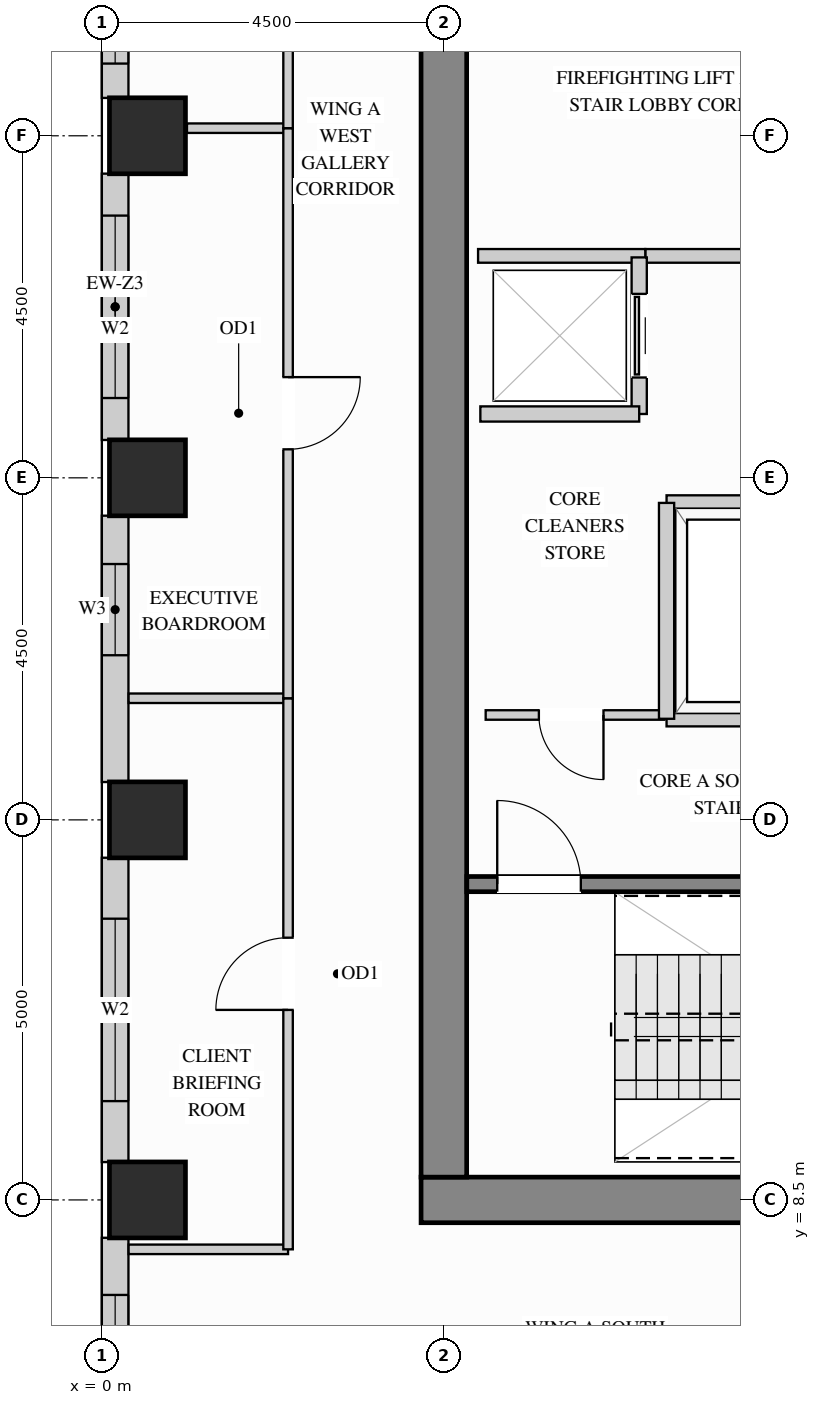
"""IFC4 building model, lengths in metres.
Left out: names, types, materials, properties, quantities, classifications, styles, units other than length and angle.
Written with IfcOpenShell. Run it as: python <this file> out.ifc"""

import sys

from ifc_helpers import new_model, si_unit, direction, frame, frame_2d, origin, origin_2d, place, context, subcontext, project, spatial, rectangle, extrude, source, transform, mapped, element, fill, save


model = new_model("IFC4")
c1 = context("Model", 3, precision=1e-05, world=origin(), true_north=direction((0.0, 1.0)))
c2 = subcontext(c1, "Body", "Model", "MODEL_VIEW")
j1 = project(units=[si_unit("LENGTHUNIT", "METRE"), si_unit("PLANEANGLEUNIT", "RADIAN")], contexts=[c1])
p1 = place(None, origin())
s1 = spatial("IfcSite", under=j1, at=p1, CompositionType="ELEMENT")
p2 = place(p1, origin())
s2 = spatial("IfcBuilding", under=s1, at=p2, CompositionType="ELEMENT")
p3 = place(p2, frame((0.0, 0.0, 146.7)))
s3 = spatial("IfcBuildingStorey", under=s2, at=p3, CompositionType="ELEMENT", Elevation=146.7)
m1 = source(origin(), c2, "Body", "SweptSolid", [
    extrude(rectangle(XDim=1.0, YDim=1.0, at=origin_2d()), origin(), (0.0, 0.0, 1.0), 3.4),
])
for number, where, z_axis, x_axis in (
    (1, (0.6, 13.5, 0.0), (0.0, 0.0, 1.0), (1.0, 0.0, 0.0)),
    (2, (0.6, 18.0, 0.0), (0.0, 0.0, 1.0), (1.0, 0.0, 0.0)),
    (3, (0.6, 22.5, 0.0), (0.0, 0.0, 1.0), (1.0, 0.0, 0.0)),
    (4, (0.6, 8.5, 0.0), (0.0, 0.0, 1.0), (1.0, 0.0, 0.0)),
):
    element("IfcColumn", number, at=place(p3, frame(where, z_axis=z_axis, x_axis=x_axis)), inside=s3, PredefinedType="COLUMN", context=c2, shape_type="MappedRepresentation", body=[
        mapped(m1, transform((0.0, 0.0, 0.0), x_axis=(1.0, 0.0, 0.0), y_axis=(0.0, 1.0, 0.0), z_axis=(0.0, 0.0, 1.0))),
    ])
m2 = source(origin(), c2, "Body", "SweptSolid", [
    extrude(rectangle(XDim=10.6, YDim=0.6, at=frame_2d((5.3, 0.0))), origin(), (0.0, 0.0, 1.0), 3.4),
])
p4 = place(p3, frame((4.2, 8.5, 0.0), z_axis=(0.0, 0.0, 1.0), x_axis=(1.0, 0.0, 0.0)))
e5 = element("IfcWall", 5, at=p4, inside=s3, PredefinedType="SHEAR", context=c2, shape_type="MappedRepresentation", body=[
    mapped(m2, transform((0.0, 0.0, 0.0), x_axis=(1.0, 0.0, 0.0), y_axis=(0.0, 1.0, 0.0), z_axis=(0.0, 0.0, 1.0))),
])
m3 = source(origin(), c2, "Body", "SweptSolid", [
    extrude(rectangle(XDim=20.4, YDim=0.6, at=frame_2d((10.2, 0.0))), origin(), (0.0, 0.0, 1.0), 3.4),
])
p5 = place(p3, frame((4.5, 8.8, 0.0), z_axis=(0.0, 0.0, 1.0), x_axis=(0.0, 1.0, 0.0)))
e6 = element("IfcWall", 6, at=p5, inside=s3, PredefinedType="SHEAR", context=c2, shape_type="MappedRepresentation", body=[
    mapped(m3, transform((0.0, 0.0, 0.0), x_axis=(1.0, 0.0, 0.0), y_axis=(0.0, 1.0, 0.0), z_axis=(0.0, 0.0, 1.0))),
])
p6 = place(p3, frame((0.175, 26.302, 0.0), z_axis=(0.0, 0.0, 1.0), x_axis=(0.0, -1.0, 0.0)))
e7 = element("IfcWall", 7, at=p6, inside=s3, PredefinedType="SOLIDWALL", context=c2, shape_type="SweptSolid", body=[
    extrude(rectangle(XDim=3.304, YDim=0.35, at=frame_2d((1.652, 0.0))), origin(), (0.0, 0.0, 1.0), 2.612),
])
p7 = place(p6, frame((0.452, 0.0, 0.78)))
e8 = element("IfcOpeningElement", 8, at=p7, cuts=e7, PredefinedType="OPENING", context=c2, shape_type="SweptSolid", body=[
    extrude(rectangle(XDim=2.4, YDim=1.652, at=frame_2d((1.2, 0.826))), frame((0.0, 0.185, 0.0), z_axis=(0.0, -1.0, 0.0), x_axis=(1.0, 0.0, 0.0)), (0.0, 0.0, 1.0), 0.37),
])
p8 = place(p3, frame((0.175, 22.002, 0.0), z_axis=(0.0, 0.0, 1.0), x_axis=(0.0, -1.0, 0.0)))
e9 = element("IfcWall", 9, at=p8, inside=s3, PredefinedType="SOLIDWALL", context=c2, shape_type="SweptSolid", body=[
    extrude(rectangle(XDim=3.504, YDim=0.35, at=frame_2d((1.752, 0.0))), origin(), (0.0, 0.0, 1.0), 2.612),
])
p9 = place(p8, frame((0.552, 0.0, 0.78)))
e10 = element("IfcOpeningElement", 10, at=p9, cuts=e9, PredefinedType="OPENING", context=c2, shape_type="SweptSolid", body=[
    extrude(rectangle(XDim=2.4, YDim=1.652, at=frame_2d((1.2, 0.826))), frame((0.0, 0.185, 0.0), z_axis=(0.0, -1.0, 0.0), x_axis=(1.0, 0.0, 0.0)), (0.0, 0.0, 1.0), 0.37),
])
p10 = place(p3, frame((0.175, 17.502, 0.0), z_axis=(0.0, 0.0, 1.0), x_axis=(0.0, -1.0, 0.0)))
e11 = element("IfcWall", 11, at=p10, inside=s3, PredefinedType="SOLIDWALL", context=c2, shape_type="SweptSolid", body=[
    extrude(rectangle(XDim=3.504, YDim=0.35, at=frame_2d((1.752, 0.0))), origin(), (0.0, 0.0, 1.0), 2.612),
])
p11 = place(p10, frame((0.636, 0.0, 0.78)))
e12 = element("IfcOpeningElement", 12, at=p11, cuts=e11, PredefinedType="OPENING", context=c2, shape_type="SweptSolid", body=[
    extrude(rectangle(XDim=1.2, YDim=1.652, at=frame_2d((0.6, 0.826))), frame((0.0, 0.185, 0.0), z_axis=(0.0, -1.0, 0.0), x_axis=(1.0, 0.0, 0.0)), (0.0, 0.0, 1.0), 0.37),
])
p12 = place(p3, frame((0.175, 13.002, 0.0), z_axis=(0.0, 0.0, 1.0), x_axis=(0.0, -1.0, 0.0)))
e13 = element("IfcWall", 13, at=p12, inside=s3, PredefinedType="SOLIDWALL", context=c2, shape_type="SweptSolid", body=[
    extrude(rectangle(XDim=4.004, YDim=0.35, at=frame_2d((2.002, 0.0))), origin(), (0.0, 0.0, 1.0), 2.612),
])
p13 = place(p12, frame((0.802, 0.0, 0.78)))
e14 = element("IfcOpeningElement", 14, at=p13, cuts=e13, PredefinedType="OPENING", context=c2, shape_type="SweptSolid", body=[
    extrude(rectangle(XDim=2.4, YDim=1.652, at=frame_2d((1.2, 0.826))), frame((0.0, 0.185, 0.0), z_axis=(0.0, -1.0, 0.0), x_axis=(1.0, 0.0, 0.0)), (0.0, 0.0, 1.0), 0.37),
])
p14 = place(p3, frame((0.175, 8.002, 0.0), z_axis=(0.0, 0.0, 1.0), x_axis=(0.0, -1.0, 0.0)))
e15 = element("IfcWall", 15, at=p14, inside=s3, PredefinedType="SOLIDWALL", context=c2, shape_type="SweptSolid", body=[
    extrude(rectangle(XDim=4.004, YDim=0.35, at=frame_2d((2.002, 0.0))), origin(), (0.0, 0.0, 1.0), 2.612),
])
p15 = place(p14, frame((0.752, 0.0, 0.78)))
e16 = element("IfcOpeningElement", 16, at=p15, cuts=e15, PredefinedType="OPENING", context=c2, shape_type="SweptSolid", body=[
    extrude(rectangle(XDim=1.2, YDim=1.652, at=frame_2d((0.6, 0.826))), frame((0.0, 0.185, 0.0), z_axis=(0.0, -1.0, 0.0), x_axis=(1.0, 0.0, 0.0)), (0.0, 0.0, 1.0), 0.37),
])
p16 = place(p3, frame((7.15, 20.92, 0.0), z_axis=(0.0, 0.0, 1.0), x_axis=(1.0, 0.0, 0.0)))
e17 = element("IfcWall", 17, at=p16, inside=s3, PredefinedType="PARTITIONING", context=c2, shape_type="SweptSolid", body=[
    extrude(rectangle(XDim=4.68, YDim=0.18, at=frame_2d((2.34, 0.0))), origin(), (0.0, 0.0, 1.0), 3.385),
])
p17 = place(p16, frame((2.2, 0.0, 0.0)))
e18 = element("IfcOpeningElement", 18, at=p17, cuts=e17, PredefinedType="OPENING", context=c2, shape_type="SweptSolid", body=[
    extrude(rectangle(XDim=1.1, YDim=2.15, at=frame_2d((0.55, 1.075))), frame((0.0, 0.1, 0.0), z_axis=(0.0, -1.0, 0.0), x_axis=(1.0, 0.0, 0.0)), (0.0, 0.0, 1.0), 0.2),
])
m4 = source(origin(), c2, "Body", "SweptSolid", [
    extrude(rectangle(XDim=2.2, YDim=0.18, at=frame_2d((1.1, 0.0))), origin(), (0.0, 0.0, 1.0), 3.385),
])
p18 = place(p3, frame((4.95, 20.92, 0.0), z_axis=(0.0, 0.0, 1.0), x_axis=(1.0, 0.0, 0.0)))
e19 = element("IfcWall", 19, at=p18, inside=s3, PredefinedType="PARTITIONING", context=c2, shape_type="MappedRepresentation", body=[
    mapped(m4, transform((0.0, 0.0, 0.0), x_axis=(1.0, 0.0, 0.0), y_axis=(0.0, 1.0, 0.0), z_axis=(0.0, 0.0, 1.0))),
])
p19 = place(p3, frame((5.05, 14.88, 0.0), z_axis=(0.0, 0.0, 1.0), x_axis=(1.0, 0.0, 0.0)))
e20 = element("IfcWall", 20, at=p19, inside=s3, PredefinedType="PARTITIONING", context=c2, shape_type="SweptSolid", body=[
    extrude(rectangle(XDim=2.35, YDim=0.125, at=frame_2d((1.175, 0.0))), origin(), (0.0, 0.0, 1.0), 3.385),
])
p20 = place(p19, frame((0.7, 0.0, 0.0)))
e21 = element("IfcOpeningElement", 21, at=p20, cuts=e20, PredefinedType="OPENING", context=c2, shape_type="SweptSolid", body=[
    extrude(rectangle(XDim=0.85, YDim=2.1, at=frame_2d((0.425, 1.05))), frame((0.0, 0.073, 0.0), z_axis=(0.0, -1.0, 0.0), x_axis=(1.0, 0.0, 0.0)), (0.0, 0.0, 1.0), 0.145),
])
m5 = source(origin(), c2, "Body", "SweptSolid", [
    extrude(rectangle(XDim=2.098, YDim=0.125, at=frame_2d((1.049, 0.0))), origin(), (0.0, 0.0, 1.0), 3.385),
])
for number, where, z_axis, x_axis in (
    (22, (0.352, 7.85, 0.0), (0.0, 0.0, 1.0), (1.0, 0.0, 0.0)),
    (23, (0.352, 15.1, 0.0), (0.0, 0.0, 1.0), (1.0, 0.0, 0.0)),
):
    element("IfcWall", number, at=place(p3, frame(where, z_axis=z_axis, x_axis=x_axis)), inside=s3, PredefinedType="PARTITIONING", context=c2, shape_type="MappedRepresentation", body=[
        mapped(m5, transform((0.0, 0.0, 0.0), x_axis=(1.0, 0.0, 0.0), y_axis=(0.0, 1.0, 0.0), z_axis=(0.0, 0.0, 1.0))),
    ])
m6 = source(origin(), c2, "Body", "SweptSolid", [
    extrude(rectangle(XDim=1.33, YDim=0.125, at=frame_2d((0.665, 0.0))), origin(), (0.0, 0.0, 1.0), 3.385),
])
p21 = place(p3, frame((1.12, 22.6, 0.0), z_axis=(0.0, 0.0, 1.0), x_axis=(1.0, 0.0, 0.0)))
e24 = element("IfcWall", 24, at=p21, inside=s3, PredefinedType="PARTITIONING", context=c2, shape_type="MappedRepresentation", body=[
    mapped(m6, transform((0.0, 0.0, 0.0), x_axis=(1.0, 0.0, 0.0), y_axis=(0.0, 1.0, 0.0), z_axis=(0.0, 0.0, 1.0))),
])
p22 = place(p3, frame((2.45, 7.85, 0.0), z_axis=(0.0, 0.0, 1.0), x_axis=(0.0, 1.0, 0.0)))
e25 = element("IfcWall", 25, at=p22, inside=s3, PredefinedType="PARTITIONING", context=c2, shape_type="SweptSolid", body=[
    extrude(rectangle(XDim=7.25, YDim=0.125, at=frame_2d((3.625, 0.0))), origin(), (0.0, 0.0, 1.0), 3.385),
])
p23 = place(p22, frame((3.15, 0.0, 0.0)))
e26 = element("IfcOpeningElement", 26, at=p23, cuts=e25, PredefinedType="OPENING", context=c2, shape_type="SweptSolid", body=[
    extrude(rectangle(XDim=0.95, YDim=2.15, at=frame_2d((0.475, 1.075))), frame((0.0, 0.073, 0.0), z_axis=(0.0, -1.0, 0.0), x_axis=(1.0, 0.0, 0.0)), (0.0, 0.0, 1.0), 0.145),
])
p24 = place(p3, frame((2.45, 15.1, 0.0), z_axis=(0.0, 0.0, 1.0), x_axis=(0.0, 1.0, 0.0)))
e27 = element("IfcWall", 27, at=p24, inside=s3, PredefinedType="PARTITIONING", context=c2, shape_type="SweptSolid", body=[
    extrude(rectangle(XDim=7.5, YDim=0.125, at=frame_2d((3.75, 0.0))), origin(), (0.0, 0.0, 1.0), 3.385),
])
p25 = place(p24, frame((3.275, 0.0, 0.0)))
e28 = element("IfcOpeningElement", 28, at=p25, cuts=e27, PredefinedType="OPENING", context=c2, shape_type="SweptSolid", body=[
    extrude(rectangle(XDim=0.95, YDim=2.15, at=frame_2d((0.475, 1.075))), frame((0.0, 0.073, 0.0), z_axis=(0.0, -1.0, 0.0), x_axis=(1.0, 0.0, 0.0)), (0.0, 0.0, 1.0), 0.145),
])
p26 = place(p3, frame((2.45, 22.6, 0.0), z_axis=(0.0, 0.0, 1.0), x_axis=(0.0, 1.0, 0.0)))
e29 = element("IfcWall", 29, at=p26, inside=s3, PredefinedType="PARTITIONING", context=c2, shape_type="SweptSolid", body=[
    extrude(rectangle(XDim=7.45, YDim=0.125, at=frame_2d((3.725, 0.0))), origin(), (0.0, 0.0, 1.0), 3.385),
])
p27 = place(p26, frame((3.25, 0.0, 0.0)))
e30 = element("IfcOpeningElement", 30, at=p27, cuts=e29, PredefinedType="OPENING", context=c2, shape_type="SweptSolid", body=[
    extrude(rectangle(XDim=0.95, YDim=2.15, at=frame_2d((0.475, 1.075))), frame((0.0, 0.073, 0.0), z_axis=(0.0, -1.0, 0.0), x_axis=(1.0, 0.0, 0.0)), (0.0, 0.0, 1.0), 0.145),
])
p28 = place(p3, frame((7.07, 18.84, 0.0), z_axis=(0.0, 0.0, 1.0), x_axis=(0.0, 1.0, 0.0)))
e31 = element("IfcWall", 31, at=p28, inside=s3, PredefinedType="PARTITIONING", context=c2, shape_type="SweptSolid", body=[
    extrude(rectangle(XDim=2.06, YDim=0.2, at=frame_2d((1.03, 0.0))), origin(), (0.0, 0.0, 1.0), 3.385),
])
p29 = place(p28, frame((0.48, 0.0, 0.0)))
e32 = element("IfcOpeningElement", 32, at=p29, cuts=e31, PredefinedType="OPENING", context=c2, shape_type="SweptSolid", body=[
    extrude(rectangle(XDim=1.1, YDim=2.2, at=frame_2d((0.55, 1.1))), frame((0.0, 0.11, 0.0), z_axis=(0.0, -1.0, 0.0), x_axis=(1.0, 0.0, 0.0)), (0.0, 0.0, 1.0), 0.22),
])
m7 = source(origin(), c2, "Body", "SweptSolid", [
    extrude(rectangle(XDim=2.09, YDim=0.2, at=frame_2d((1.045, 0.0))), origin(), (0.0, 0.0, 1.0), 3.385),
])
p30 = place(p3, frame((4.98, 18.84, 0.0), z_axis=(0.0, 0.0, 1.0), x_axis=(1.0, 0.0, 0.0)))
e33 = element("IfcWall", 33, at=p30, inside=s3, PredefinedType="PARTITIONING", context=c2, shape_type="MappedRepresentation", body=[
    mapped(m7, transform((0.0, 0.0, 0.0), x_axis=(1.0, 0.0, 0.0), y_axis=(0.0, 1.0, 0.0), z_axis=(0.0, 0.0, 1.0))),
])
m8 = source(origin(), c2, "Body", "SweptSolid", [
    extrude(rectangle(XDim=2.04, YDim=0.2, at=frame_2d((1.02, 0.0))), origin(), (0.0, 0.0, 1.0), 3.385),
])
for number, where, z_axis, x_axis in (
    (34, (7.43, 17.67, 0.0), (0.0, 0.0, 1.0), (1.0, 0.0, 0.0)),
    (35, (7.43, 14.83, 0.0), (0.0, 0.0, 1.0), (1.0, 0.0, 0.0)),
):
    element("IfcWall", number, at=place(p3, frame(where, z_axis=z_axis, x_axis=x_axis)), inside=s3, PredefinedType="PARTITIONING", context=c2, shape_type="MappedRepresentation", body=[
        mapped(m8, transform((0.0, 0.0, 0.0), x_axis=(1.0, 0.0, 0.0), y_axis=(0.0, 1.0, 0.0), z_axis=(0.0, 0.0, 1.0))),
    ])
m9 = source(origin(), c2, "Body", "SweptSolid", [
    extrude(rectangle(XDim=2.84, YDim=0.2, at=frame_2d((1.42, 0.0))), origin(), (0.0, 0.0, 1.0), 3.385),
])
p31 = place(p3, frame((7.43, 14.83, 0.0), z_axis=(0.0, 0.0, 1.0), x_axis=(0.0, 1.0, 0.0)))
e36 = element("IfcWall", 36, at=p31, inside=s3, PredefinedType="PARTITIONING", context=c2, shape_type="MappedRepresentation", body=[
    mapped(m9, transform((0.0, 0.0, 0.0), x_axis=(1.0, 0.0, 0.0), y_axis=(0.0, 1.0, 0.0), z_axis=(0.0, 0.0, 1.0))),
])
p32 = place(p3, frame((4.802, 12.655, 0.0), z_axis=(0.0, 0.0, 1.0), x_axis=(1.0, 0.0, 0.0)))
e37 = element("IfcWall", 37, at=p32, inside=s3, PredefinedType="SHEAR", context=c2, shape_type="SweptSolid", body=[
    extrude(rectangle(XDim=7.603, YDim=0.2, at=frame_2d((3.802, 0.0))), origin(), (0.0, 0.0, 1.0), 3.4),
])
p33 = place(p32, frame((0.4, 0.0, 0.0)))
e38 = element("IfcOpeningElement", 38, at=p33, cuts=e37, PredefinedType="OPENING", context=c2, shape_type="SweptSolid", body=[
    extrude(rectangle(XDim=1.1, YDim=2.15, at=frame_2d((0.55, 1.075))), frame((0.0, 0.11, 0.0), z_axis=(0.0, -1.0, 0.0), x_axis=(1.0, 0.0, 0.0)), (0.0, 0.0, 1.0), 0.22),
])
m10 = source(origin(), c2, "Body", "SweptSolid", [
    extrude(rectangle(XDim=1.1, YDim=2.2, at=frame_2d((0.55, 1.1))), frame((0.0, 0.025, 0.0), z_axis=(0.0, -1.0, 0.0), x_axis=(1.0, 0.0, 0.0)), (0.0, 0.0, 1.0), 0.05),
])
p34 = place(p29, origin())
e39 = element("IfcDoor", 39, at=p34, inside=s3, OperationType="SLIDING_TO_LEFT", PredefinedType="DOOR", context=c2, shape_type="MappedRepresentation", body=[
    mapped(m10, transform((0.0, 0.0, 0.0), x_axis=(1.0, 0.0, 0.0), y_axis=(0.0, 1.0, 0.0), z_axis=(0.0, 0.0, 1.0))),
])
fill(e32, e39)
m11 = source(origin(), c2, "Body", "SweptSolid", [
    extrude(rectangle(XDim=0.95, YDim=2.15, at=frame_2d((0.475, 1.075))), frame((0.0, 0.025, 0.0), z_axis=(0.0, -1.0, 0.0), x_axis=(1.0, 0.0, 0.0)), (0.0, 0.0, 1.0), 0.05),
])
p35 = place(p23, origin())
e40 = element("IfcDoor", 40, at=p35, inside=s3, OperationType="SINGLE_SWING_LEFT", PredefinedType="DOOR", context=c2, shape_type="MappedRepresentation", body=[
    mapped(m11, transform((0.0, 0.0, 0.0), x_axis=(1.0, 0.0, 0.0), y_axis=(0.0, 1.0, 0.0), z_axis=(0.0, 0.0, 1.0))),
])
fill(e26, e40)
p36 = place(p25, origin())
e41 = element("IfcDoor", 41, at=p36, inside=s3, OperationType="SINGLE_SWING_RIGHT", PredefinedType="DOOR", context=c2, shape_type="MappedRepresentation", body=[
    mapped(m11, transform((0.0, 0.0, 0.0), x_axis=(1.0, 0.0, 0.0), y_axis=(0.0, 1.0, 0.0), z_axis=(0.0, 0.0, 1.0))),
])
fill(e28, e41)
m12 = source(origin(), c2, "Body", "SweptSolid", [
    extrude(rectangle(XDim=0.85, YDim=2.1, at=frame_2d((0.425, 1.05))), frame((0.0, 0.025, 0.0), z_axis=(0.0, -1.0, 0.0), x_axis=(1.0, 0.0, 0.0)), (0.0, 0.0, 1.0), 0.05),
])
p37 = place(p20, origin())
e42 = element("IfcDoor", 42, at=p37, inside=s3, OperationType="SINGLE_SWING_RIGHT", PredefinedType="DOOR", context=c2, shape_type="MappedRepresentation", body=[
    mapped(m12, transform((0.0, 0.0, 0.0), x_axis=(1.0, 0.0, 0.0), y_axis=(0.0, 1.0, 0.0), z_axis=(0.0, 0.0, 1.0))),
])
fill(e21, e42)
m13 = source(origin(), c2, "Body", "SweptSolid", [
    extrude(rectangle(XDim=1.1, YDim=2.15, at=frame_2d((0.55, 1.075))), frame((0.0, 0.025, 0.0), z_axis=(0.0, -1.0, 0.0), x_axis=(1.0, 0.0, 0.0)), (0.0, 0.0, 1.0), 0.05),
])
p38 = place(p33, origin())
e43 = element("IfcDoor", 43, at=p38, inside=s3, OperationType="SINGLE_SWING_LEFT", PredefinedType="DOOR", context=c2, shape_type="MappedRepresentation", body=[
    mapped(m13, transform((0.0, 0.0, 0.0), x_axis=(1.0, 0.0, 0.0), y_axis=(0.0, 1.0, 0.0), z_axis=(0.0, 0.0, 1.0))),
])
fill(e38, e43)
m14 = source(origin(), c2, "Body", "SweptSolid", [
    extrude(rectangle(XDim=2.4, YDim=1.652, at=frame_2d((1.2, 0.826))), frame((0.0, 0.03, 0.0), z_axis=(0.0, -1.0, 0.0), x_axis=(1.0, 0.0, 0.0)), (0.0, 0.0, 1.0), 0.06),
])
p39 = place(p7, origin())
e44 = element("IfcWindow", 44, at=p39, inside=s3, PartitioningType="SINGLE_PANEL", PredefinedType="WINDOW", context=c2, shape_type="MappedRepresentation", body=[
    mapped(m14, transform((0.0, 0.0, 0.0), x_axis=(1.0, 0.0, 0.0), y_axis=(0.0, 1.0, 0.0), z_axis=(0.0, 0.0, 1.0))),
])
fill(e8, e44)
p40 = place(p9, origin())
e45 = element("IfcWindow", 45, at=p40, inside=s3, PartitioningType="SINGLE_PANEL", PredefinedType="WINDOW", context=c2, shape_type="MappedRepresentation", body=[
    mapped(m14, transform((0.0, 0.0, 0.0), x_axis=(1.0, 0.0, 0.0), y_axis=(0.0, 1.0, 0.0), z_axis=(0.0, 0.0, 1.0))),
])
fill(e10, e45)
p41 = place(p13, origin())
e46 = element("IfcWindow", 46, at=p41, inside=s3, PartitioningType="SINGLE_PANEL", PredefinedType="WINDOW", context=c2, shape_type="MappedRepresentation", body=[
    mapped(m14, transform((0.0, 0.0, 0.0), x_axis=(1.0, 0.0, 0.0), y_axis=(0.0, 1.0, 0.0), z_axis=(0.0, 0.0, 1.0))),
])
fill(e14, e46)
m15 = source(origin(), c2, "Body", "SweptSolid", [
    extrude(rectangle(XDim=1.2, YDim=1.652, at=frame_2d((0.6, 0.826))), frame((0.0, 0.03, 0.0), z_axis=(0.0, -1.0, 0.0), x_axis=(1.0, 0.0, 0.0)), (0.0, 0.0, 1.0), 0.06),
])
p42 = place(p11, origin())
e47 = element("IfcWindow", 47, at=p42, inside=s3, PartitioningType="SINGLE_PANEL", PredefinedType="WINDOW", context=c2, shape_type="MappedRepresentation", body=[
    mapped(m15, transform((0.0, 0.0, 0.0), x_axis=(1.0, 0.0, 0.0), y_axis=(0.0, 1.0, 0.0), z_axis=(0.0, 0.0, 1.0))),
])
fill(e12, e47)
p43 = place(p15, origin())
e48 = element("IfcWindow", 48, at=p43, inside=s3, PartitioningType="SINGLE_PANEL", PredefinedType="WINDOW", context=c2, shape_type="MappedRepresentation", body=[
    mapped(m15, transform((0.0, 0.0, 0.0), x_axis=(1.0, 0.0, 0.0), y_axis=(0.0, 1.0, 0.0), z_axis=(0.0, 0.0, 1.0))),
])
fill(e16, e48)
save(model, sys.argv[1])
